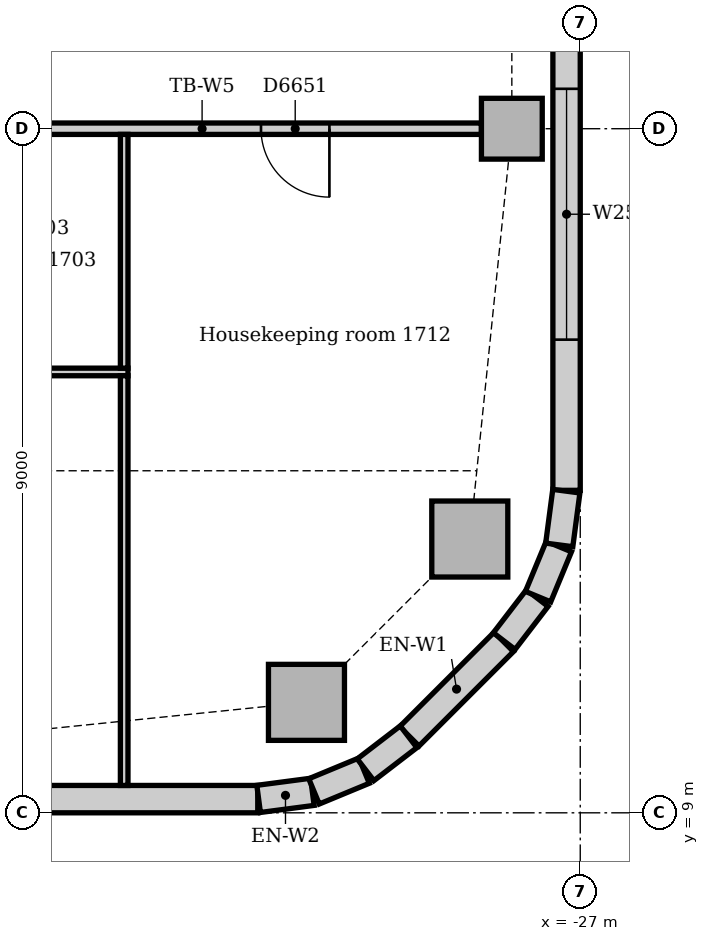
"""IFC4 building model, lengths in metres.
Left out: names, types, materials, properties, quantities, classifications, styles, units other than length and angle.
Written with IfcOpenShell. Run it as: python <this file> out.ifc"""

import sys

from ifc_helpers import new_model, si_unit, direction, frame, frame_2d, origin, origin_2d, place, context, subcontext, project, spatial, rectangle, extrude, element, fill, save


model = new_model("IFC4")
c1 = context("Model", 3, precision=1e-05, world=origin(), true_north=direction((0.0, 1.0)))
c2 = subcontext(c1, "Body", "Model", "MODEL_VIEW")
j1 = project(units=[si_unit("LENGTHUNIT", "METRE"), si_unit("PLANEANGLEUNIT", "RADIAN")], contexts=[c1])
p1 = place(None, origin())
s1 = spatial("IfcSite", under=j1, at=p1, CompositionType="ELEMENT")
p2 = place(p1, origin())
s2 = spatial("IfcBuilding", under=s1, at=p2, CompositionType="ELEMENT")
p3 = place(p2, frame((0.0, 0.0, 75.0)))
s3 = spatial("IfcBuildingStorey", under=s2, at=p3, CompositionType="ELEMENT", Elevation=75.0)
for number, where, z_axis, x_axis in (
    (1, (-30.602, 10.453, 0.0), (0.0, 0.0, 1.0), (1.0, 0.0, 0.0)),
    (2, (-28.453, 12.602, 0.0), (0.0, 0.0, 1.0), (1.0, 0.0, 0.0)),
):
    element("IfcColumn", number, at=place(p3, frame(where, z_axis=z_axis, x_axis=x_axis)), inside=s3, PredefinedType="COLUMN", context=c2, shape_type="SweptSolid", body=[
        extrude(rectangle(XDim=1.0, YDim=1.0, at=origin_2d()), origin(), (0.0, 0.0, 1.0), 3.85),
    ])
p4 = place(p3, frame((-27.9, 18.0, 0.0), z_axis=(0.0, 0.0, 1.0), x_axis=(1.0, 0.0, 0.0)))
e3 = element("IfcColumn", 3, at=p4, inside=s3, PredefinedType="COLUMN", context=c2, shape_type="SweptSolid", body=[
    extrude(rectangle(XDim=0.8, YDim=0.8, at=origin_2d()), origin(), (0.0, 0.0, 1.0), 3.85),
])
p5 = place(p3, frame((-55.007, 9.18, 0.0), z_axis=(0.0, 0.0, 1.0), x_axis=(1.0, 0.0, 0.0)))
e4 = element("IfcWall", 4, at=p5, inside=s3, PredefinedType="STANDARD", context=c2, shape_type="SweptSolid", body=[
    extrude(rectangle(XDim=23.765, YDim=0.36, at=frame_2d((11.882, 0.0))), origin(), (0.0, 0.0, 1.0), 3.85),
])
p6 = place(p5, frame((4.232, 0.0, 0.9)))
e5 = element("IfcOpeningElement", 5, at=p6, cuts=e4, PredefinedType="OPENING", context=c2, shape_type="SweptSolid", body=[
    extrude(rectangle(XDim=1.8, YDim=1.6, at=frame_2d((0.9, 0.8))), frame((0.0, 0.19, 0.0), z_axis=(0.0, -1.0, 0.0), x_axis=(1.0, 0.0, 0.0)), (0.0, 0.0, 1.0), 0.38),
])
p7 = place(p5, frame((7.982, 0.0, 0.9)))
e6 = element("IfcOpeningElement", 6, at=p7, cuts=e4, PredefinedType="OPENING", context=c2, shape_type="SweptSolid", body=[
    extrude(rectangle(XDim=3.3, YDim=1.6, at=frame_2d((1.65, 0.8))), frame((0.0, 0.19, 0.0), z_axis=(0.0, -1.0, 0.0), x_axis=(1.0, 0.0, 0.0)), (0.0, 0.0, 1.0), 0.38),
])
p8 = place(p5, frame((13.232, 0.0, 0.9)))
e7 = element("IfcOpeningElement", 7, at=p8, cuts=e4, PredefinedType="OPENING", context=c2, shape_type="SweptSolid", body=[
    extrude(rectangle(XDim=1.8, YDim=1.6, at=frame_2d((0.9, 0.8))), frame((0.0, 0.19, 0.0), z_axis=(0.0, -1.0, 0.0), x_axis=(1.0, 0.0, 0.0)), (0.0, 0.0, 1.0), 0.38),
])
p9 = place(p5, frame((16.982, 0.0, 0.9)))
e8 = element("IfcOpeningElement", 8, at=p9, cuts=e4, PredefinedType="OPENING", context=c2, shape_type="SweptSolid", body=[
    extrude(rectangle(XDim=3.3, YDim=1.6, at=frame_2d((1.65, 0.8))), frame((0.0, 0.19, 0.0), z_axis=(0.0, -1.0, 0.0), x_axis=(1.0, 0.0, 0.0)), (0.0, 0.0, 1.0), 0.38),
])
p10 = place(p3, frame((-29.249, 10.006, 0.0), z_axis=(0.0, 0.0, 1.0), x_axis=(0.707106781187, 0.707106781187, 0.0)))
e9 = element("IfcWall", 9, at=p10, inside=s3, PredefinedType="STANDARD", context=c2, shape_type="SweptSolid", body=[
    extrude(rectangle(XDim=1.757, YDim=0.36, at=frame_2d((0.879, 0.0))), origin(), (0.0, 0.0, 1.0), 3.85),
])
p11 = place(p3, frame((-27.18, 13.243, 0.0), z_axis=(0.0, 0.0, 1.0), x_axis=(0.0, 1.0, 0.0)))
e10 = element("IfcWall", 10, at=p11, inside=s3, PredefinedType="STANDARD", context=c2, shape_type="SweptSolid", body=[
    extrude(rectangle(XDim=7.757, YDim=0.36, at=frame_2d((3.879, 0.0))), origin(), (0.0, 0.0, 1.0), 3.85),
])
p12 = place(p11, frame((1.982, 0.0, 0.9)))
e11 = element("IfcOpeningElement", 11, at=p12, cuts=e10, PredefinedType="OPENING", context=c2, shape_type="SweptSolid", body=[
    extrude(rectangle(XDim=3.3, YDim=1.6, at=frame_2d((1.65, 0.8))), frame((0.0, 0.19, 0.0), z_axis=(0.0, -1.0, 0.0), x_axis=(1.0, 0.0, 0.0)), (0.0, 0.0, 1.0), 0.38),
])
for number, where, z_axis, x_axis in (
    (12, (-31.231, 9.183, 0.0), (0.0, 0.0, 1.0), (0.991, 0.131, 0.0)),
    (13, (-30.503, 9.282, 0.0), (0.0, 0.0, 1.0), (0.924, 0.383, 0.0)),
):
    element("IfcWall", number, at=place(p3, frame(where, z_axis=z_axis, x_axis=x_axis)), inside=s3, PredefinedType="STANDARD", context=c2, shape_type="SweptSolid", body=[
        extrude(rectangle(XDim=0.713, YDim=0.36, at=frame_2d((0.356, 0.0))), origin(), (0.0, 0.0, 1.0), 3.85),
    ])
for number, where, z_axis, x_axis in (
    (14, (-29.825, 9.566, 0.0), (0.0, 0.0, 1.0), (0.793, 0.609, 0.0)),
    (15, (-28.0, 11.259, 0.0), (0.0, 0.0, 1.0), (0.609, 0.793, 0.0)),
):
    element("IfcWall", number, at=place(p3, frame(where, z_axis=z_axis, x_axis=x_axis)), inside=s3, PredefinedType="STANDARD", context=c2, shape_type="SweptSolid", body=[
        extrude(rectangle(XDim=0.713, YDim=0.36, at=frame_2d((0.357, 0.0))), origin(), (0.0, 0.0, 1.0), 3.85),
    ])
for number, where, z_axis, x_axis in (
    (16, (-27.555, 11.844, 0.0), (0.0, 0.0, 1.0), (0.383, 0.924, 0.0)),
    (17, (-27.276, 12.524, 0.0), (0.0, 0.0, 1.0), (0.131, 0.991, 0.0)),
):
    element("IfcWall", number, at=place(p3, frame(where, z_axis=z_axis, x_axis=x_axis)), inside=s3, PredefinedType="STANDARD", context=c2, shape_type="SweptSolid", body=[
        extrude(rectangle(XDim=0.713, YDim=0.36, at=frame_2d((0.356, 0.0))), origin(), (0.0, 0.0, 1.0), 3.85),
    ])
p13 = place(p3, frame((-35.65, 18.0, 0.0), z_axis=(0.0, 0.0, 1.0), x_axis=(1.0, 0.0, 0.0)))
e18 = element("IfcWall", 18, at=p13, inside=s3, PredefinedType="PARTITIONING", context=c2, shape_type="SweptSolid", body=[
    extrude(rectangle(XDim=7.35, YDim=0.15, at=frame_2d((3.675, 0.0))), origin(), (0.0, 0.0, 1.0), 3.158),
])
p14 = place(p13, frame((4.45, 0.0, 0.0)))
e19 = element("IfcOpeningElement", 19, at=p14, cuts=e18, PredefinedType="OPENING", context=c2, shape_type="SweptSolid", body=[
    extrude(rectangle(XDim=0.9, YDim=2.1, at=frame_2d((0.45, 1.05))), frame((0.0, 0.085, 0.0), z_axis=(0.0, -1.0, 0.0), x_axis=(1.0, 0.0, 0.0)), (0.0, 0.0, 1.0), 0.17),
])
p15 = place(p3, frame((-41.925, 14.8, 0.0), z_axis=(0.0, 0.0, 1.0), x_axis=(1.0, 0.0, 0.0)))
e20 = element("IfcWall", 20, at=p15, inside=s3, PredefinedType="PARTITIONING", context=c2, shape_type="SweptSolid", body=[
    extrude(rectangle(XDim=8.975, YDim=0.1, at=frame_2d((4.487, 0.0))), origin(), (0.0, 0.0, 1.0), 3.85),
])
p16 = place(p15, frame((3.265, 0.0, 0.0)))
e21 = element("IfcOpeningElement", 21, at=p16, cuts=e20, PredefinedType="OPENING", context=c2, shape_type="SweptSolid", body=[
    extrude(rectangle(XDim=0.9, YDim=2.1, at=frame_2d((0.45, 1.05))), frame((0.0, 0.06, 0.0), z_axis=(0.0, -1.0, 0.0), x_axis=(1.0, 0.0, 0.0)), (0.0, 0.0, 1.0), 0.12),
])
p17 = place(p3, frame((-33.0, 14.85, 0.0), z_axis=(0.0, 0.0, 1.0), x_axis=(0.0, 1.0, 0.0)))
e22 = element("IfcWall", 22, at=p17, inside=s3, PredefinedType="PARTITIONING", context=c2, shape_type="SweptSolid", body=[
    extrude(rectangle(XDim=3.075, YDim=0.1, at=frame_2d((1.538, 0.0))), origin(), (0.0, 0.0, 1.0), 3.85),
])
p18 = place(p3, frame((-33.0, 9.36, 0.0), z_axis=(0.0, 0.0, 1.0), x_axis=(0.0, 1.0, 0.0)))
e23 = element("IfcWall", 23, at=p18, inside=s3, PredefinedType="PARTITIONING", context=c2, shape_type="SweptSolid", body=[
    extrude(rectangle(XDim=5.39, YDim=0.1, at=frame_2d((2.695, 0.0))), origin(), (0.0, 0.0, 1.0), 3.85),
])
p19 = place(p12, origin())
e24 = element("IfcWindow", 24, at=p19, inside=s3, PartitioningType="SINGLE_PANEL", PredefinedType="WINDOW", context=c2, shape_type="SweptSolid", body=[
    extrude(rectangle(XDim=3.3, YDim=1.6, at=frame_2d((1.65, 0.8))), frame((0.0, 0.13, 0.0), z_axis=(0.0, -1.0, 0.0), x_axis=(1.0, 0.0, 0.0)), (0.0, 0.0, 1.0), 0.06),
])
fill(e11, e24)
p20 = place(p14, frame((0.9, 0.0, 0.0), z_axis=(0.0, 0.0, 1.0), x_axis=(-1.0, 0.0, 0.0)))
e25 = element("IfcDoor", 25, at=p20, inside=s3, OperationType="SINGLE_SWING_LEFT", PredefinedType="DOOR", context=c2, shape_type="SweptSolid", body=[
    extrude(rectangle(XDim=0.9, YDim=2.1, at=frame_2d((0.45, 1.05))), frame((0.0, 0.025, 0.0), z_axis=(0.0, -1.0, 0.0), x_axis=(1.0, 0.0, 0.0)), (0.0, 0.0, 1.0), 0.05),
])
fill(e19, e25)
save(model, sys.argv[1])
